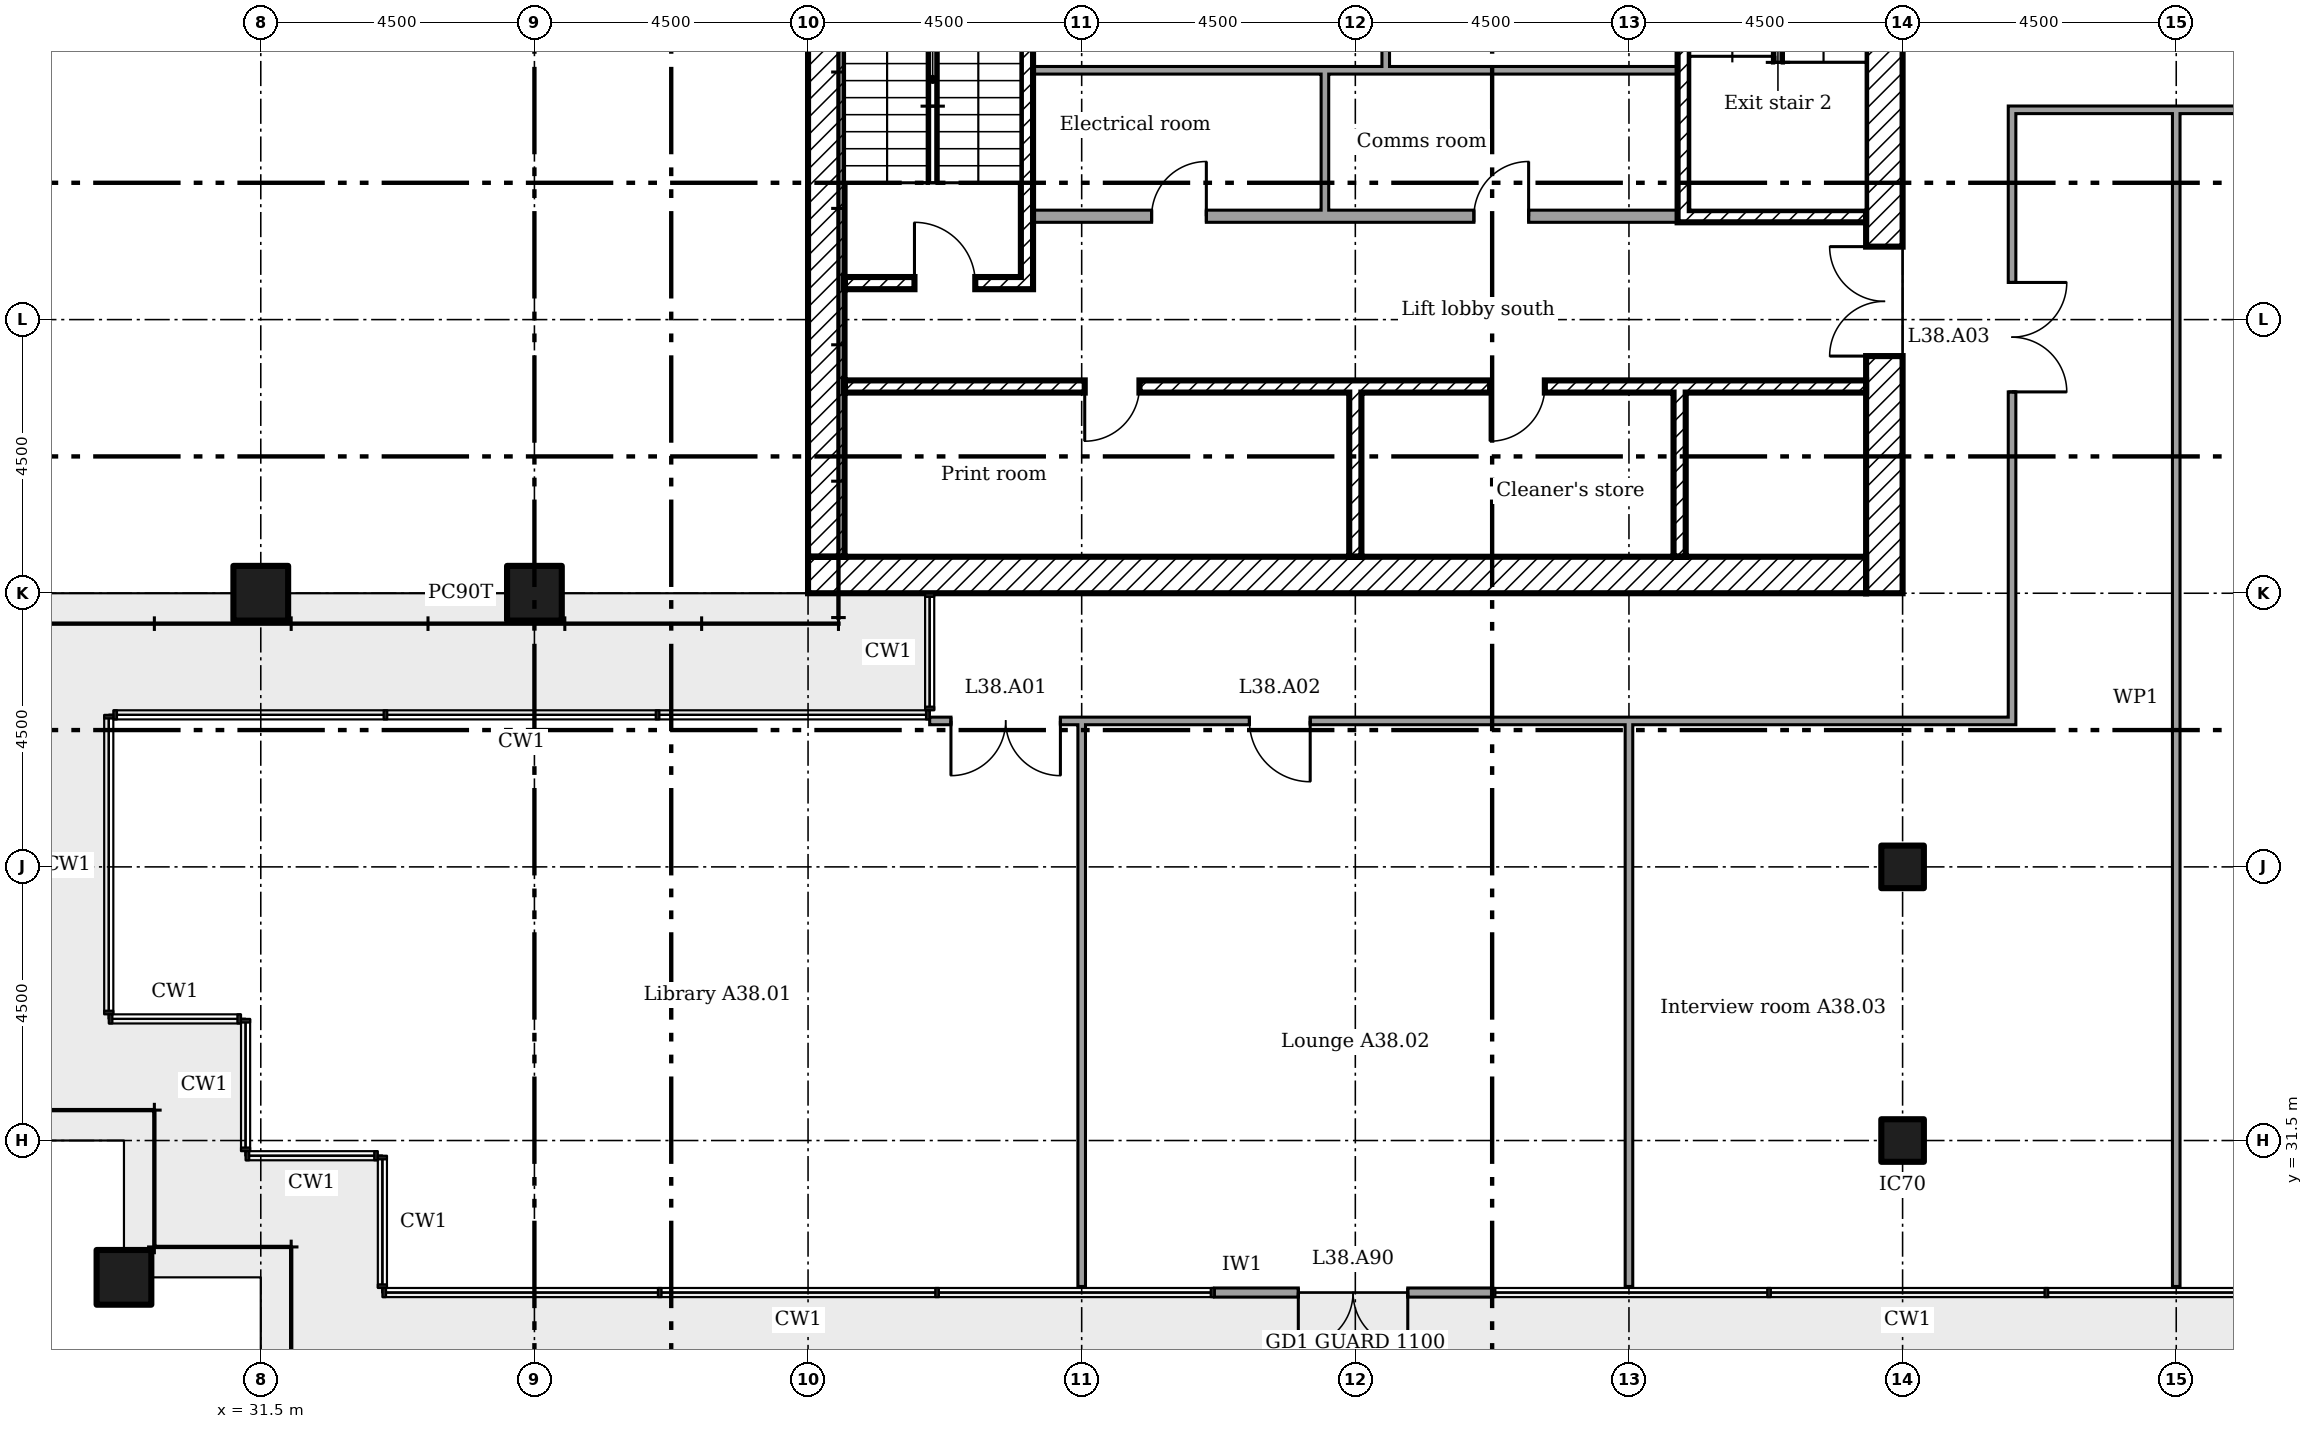
"""IFC4 building model, lengths in metres.
Left out: names, types, materials, properties, quantities, classifications, styles, units other than length and angle.
Written with IfcOpenShell. Run it as: python <this file> out.ifc"""

import sys

from ifc_helpers import new_model, si_unit, direction, frame, frame_2d, origin, origin_2d, place, context, subcontext, project, spatial, rectangle, extrude, element, fill, save


model = new_model("IFC4")
c1 = context("Model", 3, precision=1e-05, world=origin(), true_north=direction((0.0, 1.0)))
c2 = subcontext(c1, "Body", "Model", "MODEL_VIEW")
j1 = project(units=[si_unit("LENGTHUNIT", "METRE"), si_unit("PLANEANGLEUNIT", "RADIAN")], contexts=[c1])
p1 = place(None, origin())
s1 = spatial("IfcSite", under=j1, at=p1, CompositionType="ELEMENT")
p2 = place(p1, origin())
s2 = spatial("IfcBuilding", under=s1, at=p2, CompositionType="ELEMENT")
p3 = place(p2, frame((0.0, 0.0, 154.6)))
s3 = spatial("IfcBuildingStorey", under=s2, at=p3, CompositionType="ELEMENT", Elevation=154.6)
for number, where in (
    (1, (36.0, 40.5, 0.0)),
    (2, (31.5, 40.5, 0.0)),
    (3, (29.25, 29.25, 0.0)),
):
    element("IfcColumn", number, at=place(p3, frame(where)), inside=s3, PredefinedType="COLUMN", context=c2, shape_type="SweptSolid", body=[
        extrude(rectangle(XDim=0.9, YDim=0.9, at=origin_2d()), origin(), (0.0, 0.0, 1.0), 3.6),
    ])
for number, where in (
    (4, (58.5, 31.5, 0.0)),
    (5, (58.5, 36.0, 0.0)),
):
    element("IfcColumn", number, at=place(p3, frame(where)), inside=s3, PredefinedType="COLUMN", context=c2, shape_type="SweptSolid", body=[
        extrude(rectangle(XDim=0.7, YDim=0.7, at=origin_2d()), origin(), (0.0, 0.0, 1.0), 3.6),
    ])
p4 = place(p3, frame((47.182, 29.0, 0.0)))
e6 = element("IfcWall", 6, at=p4, inside=s3, PredefinedType="SOLIDWALL", context=c2, shape_type="SweptSolid", body=[
    extrude(rectangle(XDim=4.561, YDim=0.15, at=frame_2d((2.28, 0.0))), origin(), (0.0, 0.0, 1.0), 3.1),
])
p5 = place(p4, frame((1.38, 0.0, 0.0)))
e7 = element("IfcOpeningElement", 7, at=p5, cuts=e6, PredefinedType="OPENING", context=c2, shape_type="SweptSolid", body=[
    extrude(rectangle(XDim=1.8, YDim=2.4, at=frame_2d((0.9, 1.2))), frame((0.0, 0.085, 0.0), z_axis=(0.0, -1.0, 0.0), x_axis=(1.0, 0.0, 0.0)), (0.0, 0.0, 1.0), 0.17),
])
p6 = place(p3, frame((58.2, 40.5, 0.0), z_axis=(0.0, 0.0, 1.0), x_axis=(0.0, 1.0, 0.0)))
e8 = element("IfcWall", 8, at=p6, inside=s3, PredefinedType="SHEAR", context=c2, shape_type="SweptSolid", body=[
    extrude(rectangle(XDim=18.0, YDim=0.6, at=frame_2d((9.0, 0.0))), origin(), (0.0, 0.0, 1.0), 3.35),
])
p7 = place(p6, frame((13.15, 0.0, 0.0)))
e9 = element("IfcOpeningElement", 9, at=p7, cuts=e8, PredefinedType="OPENING", context=c2, shape_type="SweptSolid", body=[
    extrude(rectangle(XDim=1.2, YDim=2.1, at=frame_2d((0.6, 1.05))), frame((0.0, 0.31, 0.0), z_axis=(0.0, -1.0, 0.0), x_axis=(1.0, 0.0, 0.0)), (0.0, 0.0, 1.0), 0.62),
])
p8 = place(p6, frame((3.9, 0.0, 0.0)))
e10 = element("IfcOpeningElement", 10, at=p8, cuts=e8, PredefinedType="OPENING", context=c2, shape_type="SweptSolid", body=[
    extrude(rectangle(XDim=1.8, YDim=2.1, at=frame_2d((0.9, 1.05))), frame((0.0, 0.31, 0.0), z_axis=(0.0, -1.0, 0.0), x_axis=(1.0, 0.0, 0.0)), (0.0, 0.0, 1.0), 0.62),
])
p9 = place(p6, frame((11.525, 0.0, 0.0)))
e11 = element("IfcOpeningElement", 11, at=p9, cuts=e8, PredefinedType="OPENING", context=c2, shape_type="SweptSolid", body=[
    extrude(rectangle(XDim=1.0, YDim=2.1, at=frame_2d((0.5, 1.05))), frame((0.0, 0.31, 0.0), z_axis=(0.0, -1.0, 0.0), x_axis=(1.0, 0.0, 0.0)), (0.0, 0.0, 1.0), 0.62),
])
p10 = place(p3, frame((40.5, 40.8, 0.0)))
e12 = element("IfcWall", 12, at=p10, inside=s3, PredefinedType="SHEAR", context=c2, shape_type="SweptSolid", body=[
    extrude(rectangle(XDim=17.4, YDim=0.6, at=frame_2d((8.7, 0.0))), origin(), (0.0, 0.0, 1.0), 3.35),
])
p11 = place(p3, frame((40.8, 41.1, 0.0), z_axis=(0.0, 0.0, 1.0), x_axis=(0.0, 1.0, 0.0)))
e13 = element("IfcWall", 13, at=p11, inside=s3, PredefinedType="SHEAR", context=c2, shape_type="SweptSolid", body=[
    extrude(rectangle(XDim=16.8, YDim=0.6, at=frame_2d((8.4, 0.0))), origin(), (0.0, 0.0, 1.0), 3.35),
])
for number, where, z_axis, x_axis in (
    (14, (49.5, 41.1, 0.0), (0.0, 0.0, 1.0), (0.0, 1.0, 0.0)),
    (15, (54.833, 41.1, 0.0), (0.0, 0.0, 1.0), (0.0, 1.0, 0.0)),
):
    element("IfcWall", number, at=place(p3, frame(where, z_axis=z_axis, x_axis=x_axis)), inside=s3, PredefinedType="SHEAR", context=c2, shape_type="SweptSolid", body=[
        extrude(rectangle(XDim=2.7, YDim=0.2, at=frame_2d((1.35, 0.0))), origin(), (0.0, 0.0, 1.0), 3.35),
    ])
p12 = place(p3, frame((41.1, 43.9, 0.0)))
e16 = element("IfcWall", 16, at=p12, inside=s3, PredefinedType="SHEAR", context=c2, shape_type="SweptSolid", body=[
    extrude(rectangle(XDim=16.8, YDim=0.2, at=frame_2d((8.4, 0.0))), origin(), (0.0, 0.0, 1.0), 3.35),
])
p13 = place(p12, frame((3.95, 0.0, 0.0)))
e17 = element("IfcOpeningElement", 17, at=p13, cuts=e16, PredefinedType="OPENING", context=c2, shape_type="SweptSolid", body=[
    extrude(rectangle(XDim=0.9, YDim=2.1, at=frame_2d((0.45, 1.05))), frame((0.0, 0.11, 0.0), z_axis=(0.0, -1.0, 0.0), x_axis=(1.0, 0.0, 0.0)), (0.0, 0.0, 1.0), 0.22),
])
p14 = place(p12, frame((10.617, 0.0, 0.0)))
e18 = element("IfcOpeningElement", 18, at=p14, cuts=e16, PredefinedType="OPENING", context=c2, shape_type="SweptSolid", body=[
    extrude(rectangle(XDim=0.9, YDim=2.1, at=frame_2d((0.45, 1.05))), frame((0.0, 0.11, 0.0), z_axis=(0.0, -1.0, 0.0), x_axis=(1.0, 0.0, 0.0)), (0.0, 0.0, 1.0), 0.22),
])
p15 = place(p3, frame((44.1, 45.5, 0.0), z_axis=(0.0, 0.0, 1.0), x_axis=(0.0, 1.0, 0.0)))
e19 = element("IfcWall", 19, at=p15, inside=s3, PredefinedType="SHEAR", context=c2, shape_type="SweptSolid", body=[
    extrude(rectangle(XDim=6.9, YDim=0.2, at=frame_2d((3.45, 0.0))), origin(), (0.0, 0.0, 1.0), 3.35),
])
p16 = place(p3, frame((41.1, 45.6, 0.0)))
e20 = element("IfcWall", 20, at=p16, inside=s3, PredefinedType="SHEAR", context=c2, shape_type="SweptSolid", body=[
    extrude(rectangle(XDim=2.9, YDim=0.2, at=frame_2d((1.45, 0.0))), origin(), (0.0, 0.0, 1.0), 3.35),
])
p17 = place(p16, frame((1.15, 0.0, 0.0)))
e21 = element("IfcOpeningElement", 21, at=p17, cuts=e20, PredefinedType="OPENING", context=c2, shape_type="SweptSolid", body=[
    extrude(rectangle(XDim=1.0, YDim=2.1, at=frame_2d((0.5, 1.05))), frame((0.0, 0.11, 0.0), z_axis=(0.0, -1.0, 0.0), x_axis=(1.0, 0.0, 0.0)), (0.0, 0.0, 1.0), 0.22),
])
p18 = place(p3, frame((54.8, 46.7, 0.0)))
e22 = element("IfcWall", 22, at=p18, inside=s3, PredefinedType="SHEAR", context=c2, shape_type="SweptSolid", body=[
    extrude(rectangle(XDim=3.1, YDim=0.2, at=frame_2d((1.55, 0.0))), origin(), (0.0, 0.0, 1.0), 3.35),
])
p19 = place(p3, frame((54.9, 46.8, 0.0), z_axis=(0.0, 0.0, 1.0), x_axis=(0.0, 1.0, 0.0)))
e23 = element("IfcWall", 23, at=p19, inside=s3, PredefinedType="SHEAR", context=c2, shape_type="SweptSolid", body=[
    extrude(rectangle(XDim=6.5, YDim=0.2, at=frame_2d((3.25, 0.0))), origin(), (0.0, 0.0, 1.0), 3.35),
])
p20 = place(p3, frame((44.2, 46.7, 0.0)))
e24 = element("IfcWall", 24, at=p20, inside=s3, PredefinedType="PARTITIONING", context=c2, shape_type="SweptSolid", body=[
    extrude(rectangle(XDim=10.6, YDim=0.2, at=frame_2d((5.3, 0.0))), origin(), (0.0, 0.0, 1.0), 3.35),
])
p21 = place(p20, frame((1.95, 0.0, 0.0)))
e25 = element("IfcOpeningElement", 25, at=p21, cuts=e24, PredefinedType="OPENING", context=c2, shape_type="SweptSolid", body=[
    extrude(rectangle(XDim=0.9, YDim=2.1, at=frame_2d((0.45, 1.05))), frame((0.0, 0.11, 0.0), z_axis=(0.0, -1.0, 0.0), x_axis=(1.0, 0.0, 0.0)), (0.0, 0.0, 1.0), 0.22),
])
p22 = place(p20, frame((7.25, 0.0, 0.0)))
e26 = element("IfcOpeningElement", 26, at=p22, cuts=e24, PredefinedType="OPENING", context=c2, shape_type="SweptSolid", body=[
    extrude(rectangle(XDim=0.9, YDim=2.1, at=frame_2d((0.45, 1.05))), frame((0.0, 0.11, 0.0), z_axis=(0.0, -1.0, 0.0), x_axis=(1.0, 0.0, 0.0)), (0.0, 0.0, 1.0), 0.22),
])
p23 = place(p3, frame((49.0, 46.8, 0.0), z_axis=(0.0, 0.0, 1.0), x_axis=(0.0, 1.0, 0.0)))
e27 = element("IfcWall", 27, at=p23, inside=s3, PredefinedType="PARTITIONING", context=c2, shape_type="SweptSolid", body=[
    extrude(rectangle(XDim=2.363, YDim=0.125, at=frame_2d((1.181, 0.0))), origin(), (0.0, 0.0, 1.0), 3.35),
])
p24 = place(p3, frame((48.938, 49.1, 0.0), z_axis=(0.0, 0.0, 1.0), x_axis=(-1.0, 0.0, 0.0)))
e28 = element("IfcWall", 28, at=p24, inside=s3, PredefinedType="PARTITIONING", context=c2, shape_type="SweptSolid", body=[
    extrude(rectangle(XDim=4.738, YDim=0.125, at=frame_2d((2.369, 0.0))), origin(), (0.0, 0.0, 1.0), 3.35),
])
p25 = place(p3, frame((50.062, 49.1, 0.0), z_axis=(0.0, 0.0, 1.0), x_axis=(-1.0, 0.0, 0.0)))
e29 = element("IfcWall", 29, at=p25, inside=s3, PredefinedType="PARTITIONING", context=c2, shape_type="SweptSolid", body=[
    extrude(rectangle(XDim=1.062, YDim=0.125, at=frame_2d((0.531, 0.0))), origin(), (0.0, 0.0, 1.0), 3.35),
])
p26 = place(p3, frame((54.8, 49.1, 0.0), z_axis=(0.0, 0.0, 1.0), x_axis=(-1.0, 0.0, 0.0)))
e30 = element("IfcWall", 30, at=p26, inside=s3, PredefinedType="PARTITIONING", context=c2, shape_type="SweptSolid", body=[
    extrude(rectangle(XDim=4.8, YDim=0.125, at=frame_2d((2.4, 0.0))), origin(), (0.0, 0.0, 1.0), 3.35),
])
p27 = place(p3, frame((50.0, 49.163, 0.0), z_axis=(0.0, 0.0, 1.0), x_axis=(0.0, 1.0, 0.0)))
e31 = element("IfcWall", 31, at=p27, inside=s3, PredefinedType="PARTITIONING", context=c2, shape_type="SweptSolid", body=[
    extrude(rectangle(XDim=2.637, YDim=0.125, at=frame_2d((1.319, 0.0))), origin(), (0.0, 0.0, 1.0), 3.35),
])
p28 = place(p3, frame((42.5, 38.4, 0.0)))
e32 = element("IfcWall", 32, at=p28, inside=s3, PredefinedType="PARTITIONING", context=c2, shape_type="SweptSolid", body=[
    extrude(rectangle(XDim=17.863, YDim=0.125, at=frame_2d((8.931, 0.0))), origin(), (0.0, 0.0, 1.0), 3.45),
])
p29 = place(p28, frame((0.35, 0.0, 0.0)))
e33 = element("IfcOpeningElement", 33, at=p29, cuts=e32, PredefinedType="OPENING", context=c2, shape_type="SweptSolid", body=[
    extrude(rectangle(XDim=1.8, YDim=2.1, at=frame_2d((0.9, 1.05))), frame((0.0, 0.073, 0.0), z_axis=(0.0, -1.0, 0.0), x_axis=(1.0, 0.0, 0.0)), (0.0, 0.0, 1.0), 0.145),
])
p30 = place(p28, frame((5.258, 0.0, 0.0)))
e34 = element("IfcOpeningElement", 34, at=p30, cuts=e32, PredefinedType="OPENING", context=c2, shape_type="SweptSolid", body=[
    extrude(rectangle(XDim=1.0, YDim=2.1, at=frame_2d((0.5, 1.05))), frame((0.0, 0.073, 0.0), z_axis=(0.0, -1.0, 0.0), x_axis=(1.0, 0.0, 0.0)), (0.0, 0.0, 1.0), 0.145),
])
p31 = place(p3, frame((60.238, 48.45, 0.0)))
e35 = element("IfcWall", 35, at=p31, inside=s3, PredefinedType="PARTITIONING", context=c2, shape_type="SweptSolid", body=[
    extrude(rectangle(XDim=9.662, YDim=0.125, at=frame_2d((4.831, 0.0))), origin(), (0.0, 0.0, 1.0), 3.45),
])
p32 = place(p31, frame((5.312, 0.0, 0.0)))
e36 = element("IfcOpeningElement", 36, at=p32, cuts=e35, PredefinedType="OPENING", context=c2, shape_type="SweptSolid", body=[
    extrude(rectangle(XDim=1.8, YDim=2.1, at=frame_2d((0.9, 1.05))), frame((0.0, 0.073, 0.0), z_axis=(0.0, -1.0, 0.0), x_axis=(1.0, 0.0, 0.0)), (0.0, 0.0, 1.0), 0.145),
])
for number, where, z_axis, x_axis in (
    (37, (45.0, 29.1, 0.0), (0.0, 0.0, 1.0), (0.0, 1.0, 0.0)),
    (38, (54.0, 29.1, 0.0), (0.0, 0.0, 1.0), (0.0, 1.0, 0.0)),
):
    element("IfcWall", number, at=place(p3, frame(where, z_axis=z_axis, x_axis=x_axis)), inside=s3, PredefinedType="PARTITIONING", context=c2, shape_type="SweptSolid", body=[
        extrude(rectangle(XDim=9.3, YDim=0.125, at=frame_2d((4.65, 0.0))), origin(), (0.0, 0.0, 1.0), 2.766),
    ])
p33 = place(p3, frame((60.3, 38.462, 0.0), z_axis=(0.0, 0.0, 1.0), x_axis=(0.0, 1.0, 0.0)))
e39 = element("IfcWall", 39, at=p33, inside=s3, PredefinedType="PARTITIONING", context=c2, shape_type="SweptSolid", body=[
    extrude(rectangle(XDim=9.925, YDim=0.125, at=frame_2d((4.962, 0.0))), origin(), (0.0, 0.0, 1.0), 3.45),
])
p34 = place(p33, frame((5.348, 0.0, 0.0)))
e40 = element("IfcOpeningElement", 40, at=p34, cuts=e39, PredefinedType="OPENING", context=c2, shape_type="SweptSolid", body=[
    extrude(rectangle(XDim=1.8, YDim=2.1, at=frame_2d((0.9, 1.05))), frame((0.0, 0.073, 0.0), z_axis=(0.0, -1.0, 0.0), x_axis=(1.0, 0.0, 0.0)), (0.0, 0.0, 1.0), 0.145),
])
p35 = place(p3, frame((63.0, 29.1, 0.0), z_axis=(0.0, 0.0, 1.0), x_axis=(0.0, 1.0, 0.0)))
e41 = element("IfcWall", 41, at=p35, inside=s3, PredefinedType="PARTITIONING", context=c2, shape_type="SweptSolid", body=[
    extrude(rectangle(XDim=19.35, YDim=0.125, at=frame_2d((9.675, 0.0))), origin(), (0.0, 0.0, 1.0), 3.45),
])
p36 = place(p5, frame((1.8, 0.0, 0.0), x_axis=(-1.0, 0.0, 0.0)))
e42 = element("IfcDoor", 42, at=p36, inside=s3, OperationType="DOUBLE_DOOR_DOUBLE_SWING", PredefinedType="NOTDEFINED", context=c2, shape_type="SweptSolid", body=[
    extrude(rectangle(XDim=1.8, YDim=2.4, at=frame_2d((0.9, 1.2))), frame((0.0, 0.025, 0.0), z_axis=(0.0, -1.0, 0.0), x_axis=(1.0, 0.0, 0.0)), (0.0, 0.0, 1.0), 0.05),
])
fill(e7, e42)
p37 = place(p8, origin())
e43 = element("IfcDoor", 43, at=p37, inside=s3, OperationType="DOUBLE_DOOR_SINGLE_SWING", PredefinedType="DOOR", context=c2, shape_type="SweptSolid", body=[
    extrude(rectangle(XDim=1.8, YDim=2.1, at=frame_2d((0.9, 1.05))), frame((0.0, 0.025, 0.0), z_axis=(0.0, -1.0, 0.0), x_axis=(1.0, 0.0, 0.0)), (0.0, 0.0, 1.0), 0.05),
])
fill(e10, e43)
p38 = place(p17, origin())
e44 = element("IfcDoor", 44, at=p38, inside=s3, OperationType="SINGLE_SWING_RIGHT", PredefinedType="DOOR", context=c2, shape_type="SweptSolid", body=[
    extrude(rectangle(XDim=1.0, YDim=2.1, at=frame_2d((0.5, 1.05))), frame((0.0, 0.025, 0.0), z_axis=(0.0, -1.0, 0.0), x_axis=(1.0, 0.0, 0.0)), (0.0, 0.0, 1.0), 0.05),
])
fill(e21, e44)
p39 = place(p13, frame((0.9, 0.0, 0.0), x_axis=(-1.0, 0.0, 0.0)))
e45 = element("IfcDoor", 45, at=p39, inside=s3, OperationType="SINGLE_SWING_LEFT", PredefinedType="DOOR", context=c2, shape_type="SweptSolid", body=[
    extrude(rectangle(XDim=0.9, YDim=2.1, at=frame_2d((0.45, 1.05))), frame((0.0, 0.025, 0.0), z_axis=(0.0, -1.0, 0.0), x_axis=(1.0, 0.0, 0.0)), (0.0, 0.0, 1.0), 0.05),
])
fill(e17, e45)
p40 = place(p14, frame((0.9, 0.0, 0.0), x_axis=(-1.0, 0.0, 0.0)))
e46 = element("IfcDoor", 46, at=p40, inside=s3, OperationType="SINGLE_SWING_LEFT", PredefinedType="DOOR", context=c2, shape_type="SweptSolid", body=[
    extrude(rectangle(XDim=0.9, YDim=2.1, at=frame_2d((0.45, 1.05))), frame((0.0, 0.025, 0.0), z_axis=(0.0, -1.0, 0.0), x_axis=(1.0, 0.0, 0.0)), (0.0, 0.0, 1.0), 0.05),
])
fill(e18, e46)
p41 = place(p21, origin())
e47 = element("IfcDoor", 47, at=p41, inside=s3, OperationType="SINGLE_SWING_LEFT", PredefinedType="DOOR", context=c2, shape_type="SweptSolid", body=[
    extrude(rectangle(XDim=0.9, YDim=2.1, at=frame_2d((0.45, 1.05))), frame((0.0, 0.025, 0.0), z_axis=(0.0, -1.0, 0.0), x_axis=(1.0, 0.0, 0.0)), (0.0, 0.0, 1.0), 0.05),
])
fill(e25, e47)
p42 = place(p22, origin())
e48 = element("IfcDoor", 48, at=p42, inside=s3, OperationType="SINGLE_SWING_LEFT", PredefinedType="DOOR", context=c2, shape_type="SweptSolid", body=[
    extrude(rectangle(XDim=0.9, YDim=2.1, at=frame_2d((0.45, 1.05))), frame((0.0, 0.025, 0.0), z_axis=(0.0, -1.0, 0.0), x_axis=(1.0, 0.0, 0.0)), (0.0, 0.0, 1.0), 0.05),
])
fill(e26, e48)
p43 = place(p29, frame((1.8, 0.0, 0.0), x_axis=(-1.0, 0.0, 0.0)))
e49 = element("IfcDoor", 49, at=p43, inside=s3, OperationType="DOUBLE_DOOR_SINGLE_SWING", PredefinedType="DOOR", context=c2, shape_type="SweptSolid", body=[
    extrude(rectangle(XDim=1.8, YDim=2.1, at=frame_2d((0.9, 1.05))), frame((0.0, 0.025, 0.0), z_axis=(0.0, -1.0, 0.0), x_axis=(1.0, 0.0, 0.0)), (0.0, 0.0, 1.0), 0.05),
])
fill(e33, e49)
p44 = place(p30, frame((1.0, 0.0, 0.0), x_axis=(-1.0, 0.0, 0.0)))
e50 = element("IfcDoor", 50, at=p44, inside=s3, OperationType="SINGLE_SWING_RIGHT", PredefinedType="DOOR", context=c2, shape_type="SweptSolid", body=[
    extrude(rectangle(XDim=1.0, YDim=2.1, at=frame_2d((0.5, 1.05))), frame((0.0, 0.025, 0.0), z_axis=(0.0, -1.0, 0.0), x_axis=(1.0, 0.0, 0.0)), (0.0, 0.0, 1.0), 0.05),
])
fill(e34, e50)
p45 = place(p34, frame((1.8, 0.0, 0.0), x_axis=(-1.0, 0.0, 0.0)))
e51 = element("IfcDoor", 51, at=p45, inside=s3, OperationType="DOUBLE_DOOR_SINGLE_SWING", PredefinedType="DOOR", context=c2, shape_type="SweptSolid", body=[
    extrude(rectangle(XDim=1.8, YDim=2.1, at=frame_2d((0.9, 1.05))), frame((0.0, 0.025, 0.0), z_axis=(0.0, -1.0, 0.0), x_axis=(1.0, 0.0, 0.0)), (0.0, 0.0, 1.0), 0.05),
])
fill(e40, e51)
save(model, sys.argv[1])
